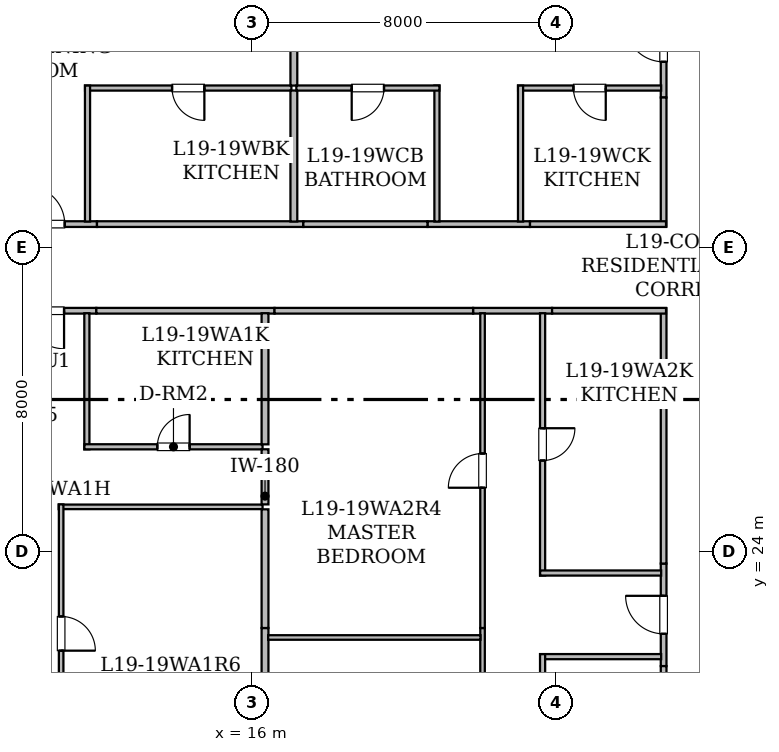
"""IFC4 building model, lengths in metres.
Left out: names, types, materials, properties, quantities, classifications, styles, units other than length and angle.
Written with IfcOpenShell. Run it as: python <this file> out.ifc"""

import sys

from ifc_helpers import new_model, si_unit, direction, frame, frame_2d, origin, place, context, subcontext, project, spatial, rectangle, extrude, element, fill, save


model = new_model("IFC4")
c1 = context("Model", 3, precision=1e-05, world=origin(), true_north=direction((0.0, 1.0)))
c2 = subcontext(c1, "Body", "Model", "MODEL_VIEW")
j1 = project(units=[si_unit("LENGTHUNIT", "METRE"), si_unit("PLANEANGLEUNIT", "RADIAN")], contexts=[c1])
p1 = place(None, origin())
s1 = spatial("IfcSite", under=j1, at=p1, CompositionType="ELEMENT")
p2 = place(p1, origin())
s2 = spatial("IfcBuilding", under=s1, at=p2, CompositionType="ELEMENT")
p3 = place(p2, frame((0.0, 0.0, 77.1)))
s3 = spatial("IfcBuildingStorey", under=s2, at=p3, CompositionType="ELEMENT", Elevation=77.1)
p4 = place(p3, frame((11.907, 30.335, 0.0), z_axis=(0.0, 0.0, 1.0), x_axis=(-1.0, 0.0, 0.0)))
e1 = element("IfcWall", 1, at=p4, inside=s3, PredefinedType="STANDARD", context=c2, shape_type="SweptSolid", body=[
    extrude(rectangle(XDim=2.698, YDim=0.15, at=frame_2d((1.349, 0.0))), origin(), (0.0, 0.0, 1.0), 3.43),
])
p5 = place(p4, frame((0.849, 0.0, 0.0)))
e2 = element("IfcOpeningElement", 2, at=p5, cuts=e1, PredefinedType="OPENING", context=c2, shape_type="SweptSolid", body=[
    extrude(rectangle(XDim=1.0, YDim=2.15, at=frame_2d((0.5, 1.075))), frame((0.0, 0.085, 0.0), z_axis=(0.0, -1.0, 0.0), x_axis=(1.0, 0.0, 0.0)), (0.0, 0.0, 1.0), 0.17),
])
p6 = place(p3, frame((16.596, 30.335, 0.0), z_axis=(0.0, 0.0, 1.0), x_axis=(-1.0, 0.0, 0.0)))
e3 = element("IfcWall", 3, at=p6, inside=s3, PredefinedType="STANDARD", context=c2, shape_type="SweptSolid", body=[
    extrude(rectangle(XDim=4.689, YDim=0.15, at=frame_2d((2.344, 0.0))), origin(), (0.0, 0.0, 1.0), 3.43),
])
p7 = place(p3, frame((26.835, 20.985, 0.0), z_axis=(0.0, 0.0, 1.0), x_axis=(0.0, 1.0, 0.0)))
e4 = element("IfcWall", 4, at=p7, inside=s3, PredefinedType="STANDARD", context=c2, shape_type="SweptSolid", body=[
    extrude(rectangle(XDim=2.698, YDim=0.15, at=frame_2d((1.349, 0.0))), origin(), (0.0, 0.0, 1.0), 3.43),
])
p8 = place(p7, frame((0.849, 0.0, 0.0)))
e5 = element("IfcOpeningElement", 5, at=p8, cuts=e4, PredefinedType="OPENING", context=c2, shape_type="SweptSolid", body=[
    extrude(rectangle(XDim=1.0, YDim=2.15, at=frame_2d((0.5, 1.075))), frame((0.0, 0.085, 0.0), z_axis=(0.0, -1.0, 0.0), x_axis=(1.0, 0.0, 0.0)), (0.0, 0.0, 1.0), 0.17),
])
p9 = place(p3, frame((23.9, 30.335, 0.0), z_axis=(0.0, 0.0, 1.0), x_axis=(-1.0, 0.0, 0.0)))
e6 = element("IfcWall", 6, at=p9, inside=s3, PredefinedType="STANDARD", context=c2, shape_type="SweptSolid", body=[
    extrude(rectangle(XDim=2.079, YDim=0.15, at=frame_2d((1.04, 0.0))), origin(), (0.0, 0.0, 1.0), 3.43),
])
p10 = place(p3, frame((26.835, 17.518, 0.0), z_axis=(0.0, 0.0, 1.0), x_axis=(0.0, 1.0, 0.0)))
e7 = element("IfcWall", 7, at=p10, inside=s3, PredefinedType="STANDARD", context=c2, shape_type="SweptSolid", body=[
    extrude(rectangle(XDim=3.467, YDim=0.15, at=frame_2d((1.733, 0.0))), origin(), (0.0, 0.0, 1.0), 2.647),
])
p11 = place(p3, frame((26.835, 23.683, 0.0), z_axis=(0.0, 0.0, 1.0), x_axis=(0.0, 1.0, 0.0)))
e8 = element("IfcWall", 8, at=p11, inside=s3, PredefinedType="STANDARD", context=c2, shape_type="SweptSolid", body=[
    extrude(rectangle(XDim=6.717, YDim=0.15, at=frame_2d((3.358, 0.0))), origin(), (0.0, 0.0, 1.0), 2.961),
])
p12 = place(p3, frame((26.898, 30.335, 0.0), z_axis=(0.0, 0.0, 1.0), x_axis=(-1.0, 0.0, 0.0)))
e9 = element("IfcWall", 9, at=p12, inside=s3, PredefinedType="STANDARD", context=c2, shape_type="SweptSolid", body=[
    extrude(rectangle(XDim=2.998, YDim=0.15, at=frame_2d((1.499, 0.0))), origin(), (0.0, 0.0, 1.0), 3.43),
])
p13 = place(p3, frame((21.821, 30.335, 0.0), z_axis=(0.0, 0.0, 1.0), x_axis=(-1.0, 0.0, 0.0)))
e10 = element("IfcWall", 10, at=p13, inside=s3, PredefinedType="STANDARD", context=c2, shape_type="SweptSolid", body=[
    extrude(rectangle(XDim=5.225, YDim=0.15, at=frame_2d((2.613, 0.0))), origin(), (0.0, 0.0, 1.0), 2.647),
])
p14 = place(p3, frame((9.226, 32.615, 0.0), z_axis=(0.0, 0.0, 1.0), x_axis=(1.0, 0.0, 0.0)))
e11 = element("IfcWall", 11, at=p14, inside=s3, PredefinedType="STANDARD", context=c2, shape_type="SweptSolid", body=[
    extrude(rectangle(XDim=2.698, YDim=0.15, at=frame_2d((1.349, 0.0))), origin(), (0.0, 0.0, 1.0), 3.43),
])
p15 = place(p14, frame((0.849, 0.0, 0.0)))
e12 = element("IfcOpeningElement", 12, at=p15, cuts=e11, PredefinedType="OPENING", context=c2, shape_type="SweptSolid", body=[
    extrude(rectangle(XDim=1.0, YDim=2.15, at=frame_2d((0.5, 1.075))), frame((0.0, 0.085, 0.0), z_axis=(0.0, -1.0, 0.0), x_axis=(1.0, 0.0, 0.0)), (0.0, 0.0, 1.0), 0.17),
])
p16 = place(p3, frame((11.924, 32.615, 0.0), z_axis=(0.0, 0.0, 1.0), x_axis=(1.0, 0.0, 0.0)))
e13 = element("IfcWall", 13, at=p16, inside=s3, PredefinedType="STANDARD", context=c2, shape_type="SweptSolid", body=[
    extrude(rectangle(XDim=5.43, YDim=0.15, at=frame_2d((2.715, 0.0))), origin(), (0.0, 0.0, 1.0), 3.43),
])
p17 = place(p3, frame((26.835, 35.946, 0.0), z_axis=(0.0, 0.0, 1.0), x_axis=(0.0, 1.0, 0.0)))
e14 = element("IfcWall", 14, at=p17, inside=s3, PredefinedType="STANDARD", context=c2, shape_type="SweptSolid", body=[
    extrude(rectangle(XDim=2.878, YDim=0.15, at=frame_2d((1.439, 0.0))), origin(), (0.0, 0.0, 1.0), 2.647),
])
p18 = place(p17, frame((0.939, 0.0, 0.0)))
e15 = element("IfcOpeningElement", 15, at=p18, cuts=e14, PredefinedType="OPENING", context=c2, shape_type="SweptSolid", body=[
    extrude(rectangle(XDim=1.0, YDim=2.15, at=frame_2d((0.5, 1.075))), frame((0.0, 0.085, 0.0), z_axis=(0.0, -1.0, 0.0), x_axis=(1.0, 0.0, 0.0)), (0.0, 0.0, 1.0), 0.17),
])
p19 = place(p3, frame((20.621, 32.615, 0.0), z_axis=(0.0, 0.0, 1.0), x_axis=(1.0, 0.0, 0.0)))
e16 = element("IfcWall", 16, at=p19, inside=s3, PredefinedType="STANDARD", context=c2, shape_type="SweptSolid", body=[
    extrude(rectangle(XDim=2.698, YDim=0.15, at=frame_2d((1.349, 0.0))), origin(), (0.0, 0.0, 1.0), 3.43),
])
p20 = place(p3, frame((17.354, 32.615, 0.0), z_axis=(0.0, 0.0, 1.0), x_axis=(1.0, 0.0, 0.0)))
e17 = element("IfcWall", 17, at=p20, inside=s3, PredefinedType="STANDARD", context=c2, shape_type="SweptSolid", body=[
    extrude(rectangle(XDim=3.267, YDim=0.15, at=frame_2d((1.634, 0.0))), origin(), (0.0, 0.0, 1.0), 2.647),
])
p21 = place(p3, frame((26.835, 32.55, 0.0), z_axis=(0.0, 0.0, 1.0), x_axis=(0.0, 1.0, 0.0)))
e18 = element("IfcWall", 18, at=p21, inside=s3, PredefinedType="STANDARD", context=c2, shape_type="SweptSolid", body=[
    extrude(rectangle(XDim=3.396, YDim=0.15, at=frame_2d((1.698, 0.0))), origin(), (0.0, 0.0, 1.0), 3.43),
])
p22 = place(p3, frame((23.319, 32.615, 0.0), z_axis=(0.0, 0.0, 1.0), x_axis=(1.0, 0.0, 0.0)))
e19 = element("IfcWall", 19, at=p22, inside=s3, PredefinedType="STANDARD", context=c2, shape_type="SweptSolid", body=[
    extrude(rectangle(XDim=3.579, YDim=0.15, at=frame_2d((1.79, 0.0))), origin(), (0.0, 0.0, 1.0), 3.43),
])
p23 = place(p3, frame((11.658, 30.27, 0.0), z_axis=(0.0, 0.0, 1.0), x_axis=(0.0, -1.0, 0.0)))
e20 = element("IfcWall", 20, at=p23, inside=s3, PredefinedType="PARTITIONING", context=c2, shape_type="SweptSolid", body=[
    extrude(rectangle(XDim=3.58, YDim=0.135, at=frame_2d((1.79, 0.0))), origin(), (0.0, 0.0, 1.0), 3.43),
])
p24 = place(p3, frame((11.593, 26.755, 0.0), z_axis=(0.0, 0.0, 1.0), x_axis=(1.0, 0.0, 0.0)))
e21 = element("IfcWall", 21, at=p24, inside=s3, PredefinedType="PARTITIONING", context=c2, shape_type="SweptSolid", body=[
    extrude(rectangle(XDim=4.688, YDim=0.135, at=frame_2d((2.344, 0.0))), origin(), (0.0, 0.0, 1.0), 3.43),
])
p25 = place(p24, frame((1.919, 0.0, 0.0)))
e22 = element("IfcOpeningElement", 22, at=p25, cuts=e21, PredefinedType="OPENING", context=c2, shape_type="SweptSolid", body=[
    extrude(rectangle(XDim=0.85, YDim=2.1, at=frame_2d((0.425, 1.05))), frame((0.0, 0.077, 0.0), z_axis=(0.0, -1.0, 0.0), x_axis=(1.0, 0.0, 0.0)), (0.0, 0.0, 1.0), 0.155),
])
p26 = place(p3, frame((16.281, 25.175, 0.0), z_axis=(0.0, 0.0, 1.0), x_axis=(-1.0, 0.0, 0.0)))
e23 = element("IfcWall", 23, at=p26, inside=s3, PredefinedType="PARTITIONING", context=c2, shape_type="SweptSolid", body=[
    extrude(rectangle(XDim=5.365, YDim=0.12, at=frame_2d((2.683, 0.0))), origin(), (0.0, 0.0, 1.0), 3.43),
])
p27 = place(p3, frame((10.981, 25.24, 0.0), z_axis=(0.0, 0.0, 1.0), x_axis=(0.0, -1.0, 0.0)))
e24 = element("IfcWall", 24, at=p27, inside=s3, PredefinedType="PARTITIONING", context=c2, shape_type="SweptSolid", body=[
    extrude(rectangle(XDim=6.798, YDim=0.12, at=frame_2d((3.399, 0.0))), origin(), (0.0, 0.0, 1.0), 2.961),
])
p28 = place(p27, frame((2.949, 0.0, 0.0)))
e25 = element("IfcOpeningElement", 25, at=p28, cuts=e24, PredefinedType="OPENING", context=c2, shape_type="SweptSolid", body=[
    extrude(rectangle(XDim=0.9, YDim=2.1, at=frame_2d((0.45, 1.05))), frame((0.0, 0.07, 0.0), z_axis=(0.0, -1.0, 0.0), x_axis=(1.0, 0.0, 0.0)), (0.0, 0.0, 1.0), 0.14),
])
p29 = place(p3, frame((16.346, 26.69, 0.0), z_axis=(0.0, 0.0, 1.0), x_axis=(0.0, -1.0, 0.0)))
e26 = element("IfcWall", 26, at=p29, inside=s3, PredefinedType="STANDARD", context=c2, shape_type="SweptSolid", body=[
    extrude(rectangle(XDim=1.45, YDim=0.18, at=frame_2d((0.725, 0.0))), origin(), (0.0, 0.0, 1.0), 3.43),
])
p30 = place(p3, frame((16.346, 30.27, 0.0), z_axis=(0.0, 0.0, 1.0), x_axis=(0.0, -1.0, 0.0)))
e27 = element("IfcWall", 27, at=p30, inside=s3, PredefinedType="STANDARD", context=c2, shape_type="SweptSolid", body=[
    extrude(rectangle(XDim=3.45, YDim=0.18, at=frame_2d((1.725, 0.0))), origin(), (0.0, 0.0, 1.0), 3.43),
])
p31 = place(p3, frame((16.346, 21.987, 0.0), z_axis=(0.0, 0.0, 1.0), x_axis=(0.0, -1.0, 0.0)))
e28 = element("IfcWall", 28, at=p31, inside=s3, PredefinedType="STANDARD", context=c2, shape_type="SweptSolid", body=[
    extrude(rectangle(XDim=3.73, YDim=0.18, at=frame_2d((1.865, 0.0))), origin(), (0.0, 0.0, 1.0), 3.43),
])
p32 = place(p3, frame((16.346, 25.11, 0.0), z_axis=(0.0, 0.0, 1.0), x_axis=(0.0, -1.0, 0.0)))
e29 = element("IfcWall", 29, at=p32, inside=s3, PredefinedType="STANDARD", context=c2, shape_type="SweptSolid", body=[
    extrude(rectangle(XDim=3.123, YDim=0.18, at=frame_2d((1.562, 0.0))), origin(), (0.0, 0.0, 1.0), 2.961),
])
p33 = place(p3, frame((26.77, 21.234, 0.0), z_axis=(0.0, 0.0, 1.0), x_axis=(-1.0, 0.0, 0.0)))
e30 = element("IfcWall", 30, at=p33, inside=s3, PredefinedType="PARTITIONING", context=c2, shape_type="SweptSolid", body=[
    extrude(rectangle(XDim=3.185, YDim=0.135, at=frame_2d((1.593, 0.0))), origin(), (0.0, 0.0, 1.0), 3.43),
])
p34 = place(p3, frame((23.65, 21.299, 0.0), z_axis=(0.0, 0.0, 1.0), x_axis=(0.0, -1.0, 0.0)))
e31 = element("IfcWall", 31, at=p34, inside=s3, PredefinedType="PARTITIONING", context=c2, shape_type="SweptSolid", body=[
    extrude(rectangle(XDim=4.095, YDim=0.135, at=frame_2d((2.047, 0.0))), origin(), (0.0, 0.0, 1.0), 2.647),
])
p35 = place(p34, frame((1.622, 0.0, 0.0)))
e32 = element("IfcOpeningElement", 32, at=p35, cuts=e31, PredefinedType="OPENING", context=c2, shape_type="SweptSolid", body=[
    extrude(rectangle(XDim=0.85, YDim=2.1, at=frame_2d((0.425, 1.05))), frame((0.0, 0.077, 0.0), z_axis=(0.0, -1.0, 0.0), x_axis=(1.0, 0.0, 0.0)), (0.0, 0.0, 1.0), 0.155),
])
p36 = place(p3, frame((23.65, 30.27, 0.0), z_axis=(0.0, 0.0, 1.0), x_axis=(0.0, -1.0, 0.0)))
e33 = element("IfcWall", 33, at=p36, inside=s3, PredefinedType="PARTITIONING", context=c2, shape_type="SweptSolid", body=[
    extrude(rectangle(XDim=6.901, YDim=0.135, at=frame_2d((3.451, 0.0))), origin(), (0.0, 0.0, 1.0), 2.961),
])
p37 = place(p36, frame((3.026, 0.0, 0.0)))
e34 = element("IfcOpeningElement", 34, at=p37, cuts=e33, PredefinedType="OPENING", context=c2, shape_type="SweptSolid", body=[
    extrude(rectangle(XDim=0.85, YDim=2.1, at=frame_2d((0.425, 1.05))), frame((0.0, 0.077, 0.0), z_axis=(0.0, -1.0, 0.0), x_axis=(1.0, 0.0, 0.0)), (0.0, 0.0, 1.0), 0.155),
])
p38 = place(p3, frame((23.585, 23.434, 0.0), z_axis=(0.0, 0.0, 1.0), x_axis=(1.0, 0.0, 0.0)))
e35 = element("IfcWall", 35, at=p38, inside=s3, PredefinedType="PARTITIONING", context=c2, shape_type="SweptSolid", body=[
    extrude(rectangle(XDim=3.185, YDim=0.135, at=frame_2d((1.593, 0.0))), origin(), (0.0, 0.0, 1.0), 3.43),
])
p39 = place(p3, frame((22.07, 14.617, 0.0), z_axis=(0.0, 0.0, 1.0), x_axis=(0.0, 1.0, 0.0)))
e36 = element("IfcWall", 36, at=p39, inside=s3, PredefinedType="PARTITIONING", context=c2, shape_type="SweptSolid", body=[
    extrude(rectangle(XDim=7.37, YDim=0.12, at=frame_2d((3.685, 0.0))), origin(), (0.0, 0.0, 1.0), 2.647),
])
p40 = place(p39, frame((3.214, 0.0, 0.0)))
e37 = element("IfcOpeningElement", 37, at=p40, cuts=e36, PredefinedType="OPENING", context=c2, shape_type="SweptSolid", body=[
    extrude(rectangle(XDim=0.9, YDim=2.1, at=frame_2d((0.45, 1.05))), frame((0.0, 0.07, 0.0), z_axis=(0.0, -1.0, 0.0), x_axis=(1.0, 0.0, 0.0)), (0.0, 0.0, 1.0), 0.14),
])
p41 = place(p3, frame((22.07, 21.987, 0.0), z_axis=(0.0, 0.0, 1.0), x_axis=(0.0, 1.0, 0.0)))
e38 = element("IfcWall", 38, at=p41, inside=s3, PredefinedType="PARTITIONING", context=c2, shape_type="SweptSolid", body=[
    extrude(rectangle(XDim=8.283, YDim=0.12, at=frame_2d((4.142, 0.0))), origin(), (0.0, 0.0, 1.0), 2.961),
])
p42 = place(p41, frame((3.691, 0.0, 0.0)))
e39 = element("IfcOpeningElement", 39, at=p42, cuts=e38, PredefinedType="OPENING", context=c2, shape_type="SweptSolid", body=[
    extrude(rectangle(XDim=0.9, YDim=2.1, at=frame_2d((0.45, 1.05))), frame((0.0, 0.07, 0.0), z_axis=(0.0, -1.0, 0.0), x_axis=(1.0, 0.0, 0.0)), (0.0, 0.0, 1.0), 0.14),
])
p43 = place(p3, frame((16.428, 21.738, 0.0), z_axis=(0.0, 0.0, 1.0), x_axis=(1.0, 0.0, 0.0)))
e40 = element("IfcWall", 40, at=p43, inside=s3, PredefinedType="PARTITIONING", context=c2, shape_type="SweptSolid", body=[
    extrude(rectangle(XDim=5.588, YDim=0.12, at=frame_2d((2.794, 0.0))), origin(), (0.0, 0.0, 1.0), 2.647),
])
p44 = place(p3, frame((17.04, 36.195, 0.0), z_axis=(0.0, 0.0, 1.0), x_axis=(-1.0, 0.0, 0.0)))
e41 = element("IfcWall", 41, at=p44, inside=s3, PredefinedType="PARTITIONING", context=c2, shape_type="SweptSolid", body=[
    extrude(rectangle(XDim=5.43, YDim=0.135, at=frame_2d((2.715, 0.0))), origin(), (0.0, 0.0, 1.0), 3.43),
])
p45 = place(p44, frame((2.29, 0.0, 0.0)))
e42 = element("IfcOpeningElement", 42, at=p45, cuts=e41, PredefinedType="OPENING", context=c2, shape_type="SweptSolid", body=[
    extrude(rectangle(XDim=0.85, YDim=2.1, at=frame_2d((0.425, 1.05))), frame((0.0, 0.077, 0.0), z_axis=(0.0, -1.0, 0.0), x_axis=(1.0, 0.0, 0.0)), (0.0, 0.0, 1.0), 0.155),
])
p46 = place(p3, frame((11.675, 36.26, 0.0), z_axis=(0.0, 0.0, 1.0), x_axis=(0.0, -1.0, 0.0)))
e43 = element("IfcWall", 43, at=p46, inside=s3, PredefinedType="PARTITIONING", context=c2, shape_type="SweptSolid", body=[
    extrude(rectangle(XDim=3.578, YDim=0.135, at=frame_2d((1.789, 0.0))), origin(), (0.0, 0.0, 1.0), 3.43),
])
p47 = place(p3, frame((17.105, 38.51, 0.0), z_axis=(0.0, 0.0, 1.0), x_axis=(0.0, -1.0, 0.0)))
e44 = element("IfcWall", 44, at=p47, inside=s3, PredefinedType="STANDARD", context=c2, shape_type="SweptSolid", body=[
    extrude(rectangle(XDim=2.25, YDim=0.18, at=frame_2d((1.125, 0.0))), origin(), (0.0, 0.0, 1.0), 2.647),
])
p48 = place(p3, frame((17.105, 36.13, 0.0), z_axis=(0.0, 0.0, 1.0), x_axis=(0.0, -1.0, 0.0)))
e45 = element("IfcWall", 45, at=p48, inside=s3, PredefinedType="STANDARD", context=c2, shape_type="SweptSolid", body=[
    extrude(rectangle(XDim=3.448, YDim=0.18, at=frame_2d((1.724, 0.0))), origin(), (0.0, 0.0, 1.0), 3.43),
])
p49 = place(p3, frame((20.87, 32.682, 0.0), z_axis=(0.0, 0.0, 1.0), x_axis=(0.0, 1.0, 0.0)))
e46 = element("IfcWall", 46, at=p49, inside=s3, PredefinedType="PARTITIONING", context=c2, shape_type="SweptSolid", body=[
    extrude(rectangle(XDim=3.578, YDim=0.135, at=frame_2d((1.789, 0.0))), origin(), (0.0, 0.0, 1.0), 3.43),
])
p50 = place(p3, frame((20.935, 36.195, 0.0), z_axis=(0.0, 0.0, 1.0), x_axis=(-1.0, 0.0, 0.0)))
e47 = element("IfcWall", 47, at=p50, inside=s3, PredefinedType="PARTITIONING", context=c2, shape_type="SweptSolid", body=[
    extrude(rectangle(XDim=3.765, YDim=0.135, at=frame_2d((1.883, 0.0))), origin(), (0.0, 0.0, 1.0), 2.647),
])
p51 = place(p50, frame((1.458, 0.0, 0.0)))
e48 = element("IfcOpeningElement", 48, at=p51, cuts=e47, PredefinedType="OPENING", context=c2, shape_type="SweptSolid", body=[
    extrude(rectangle(XDim=0.85, YDim=2.1, at=frame_2d((0.425, 1.05))), frame((0.0, 0.077, 0.0), z_axis=(0.0, -1.0, 0.0), x_axis=(1.0, 0.0, 0.0)), (0.0, 0.0, 1.0), 0.155),
])
p52 = place(p3, frame((26.77, 36.195, 0.0), z_axis=(0.0, 0.0, 1.0), x_axis=(-1.0, 0.0, 0.0)))
e49 = element("IfcWall", 49, at=p52, inside=s3, PredefinedType="PARTITIONING", context=c2, shape_type="SweptSolid", body=[
    extrude(rectangle(XDim=3.765, YDim=0.135, at=frame_2d((1.883, 0.0))), origin(), (0.0, 0.0, 1.0), 3.43),
])
p53 = place(p52, frame((1.458, 0.0, 0.0)))
e50 = element("IfcOpeningElement", 50, at=p53, cuts=e49, PredefinedType="OPENING", context=c2, shape_type="SweptSolid", body=[
    extrude(rectangle(XDim=0.85, YDim=2.1, at=frame_2d((0.425, 1.05))), frame((0.0, 0.077, 0.0), z_axis=(0.0, -1.0, 0.0), x_axis=(1.0, 0.0, 0.0)), (0.0, 0.0, 1.0), 0.155),
])
p54 = place(p3, frame((23.07, 36.26, 0.0), z_axis=(0.0, 0.0, 1.0), x_axis=(0.0, -1.0, 0.0)))
e51 = element("IfcWall", 51, at=p54, inside=s3, PredefinedType="PARTITIONING", context=c2, shape_type="SweptSolid", body=[
    extrude(rectangle(XDim=3.578, YDim=0.135, at=frame_2d((1.789, 0.0))), origin(), (0.0, 0.0, 1.0), 3.43),
])
p55 = place(p5, origin())
e52 = element("IfcDoor", 52, at=p55, inside=s3, OperationType="SINGLE_SWING_LEFT", PredefinedType="DOOR", context=c2, shape_type="SweptSolid", body=[
    extrude(rectangle(XDim=1.0, YDim=2.15, at=frame_2d((0.5, 1.075))), frame((0.0, 0.025, 0.0), z_axis=(0.0, -1.0, 0.0), x_axis=(1.0, 0.0, 0.0)), (0.0, 0.0, 1.0), 0.05),
])
fill(e2, e52)
p56 = place(p8, origin())
e53 = element("IfcDoor", 53, at=p56, inside=s3, OperationType="SINGLE_SWING_RIGHT", PredefinedType="DOOR", context=c2, shape_type="SweptSolid", body=[
    extrude(rectangle(XDim=1.0, YDim=2.15, at=frame_2d((0.5, 1.075))), frame((0.0, 0.025, 0.0), z_axis=(0.0, -1.0, 0.0), x_axis=(1.0, 0.0, 0.0)), (0.0, 0.0, 1.0), 0.05),
])
fill(e5, e53)
p57 = place(p15, origin())
e54 = element("IfcDoor", 54, at=p57, inside=s3, OperationType="SINGLE_SWING_LEFT", PredefinedType="DOOR", context=c2, shape_type="SweptSolid", body=[
    extrude(rectangle(XDim=1.0, YDim=2.15, at=frame_2d((0.5, 1.075))), frame((0.0, 0.025, 0.0), z_axis=(0.0, -1.0, 0.0), x_axis=(1.0, 0.0, 0.0)), (0.0, 0.0, 1.0), 0.05),
])
fill(e12, e54)
p58 = place(p18, origin())
e55 = element("IfcDoor", 55, at=p58, inside=s3, OperationType="SINGLE_SWING_RIGHT", PredefinedType="DOOR", context=c2, shape_type="SweptSolid", body=[
    extrude(rectangle(XDim=1.0, YDim=2.15, at=frame_2d((0.5, 1.075))), frame((0.0, 0.025, 0.0), z_axis=(0.0, -1.0, 0.0), x_axis=(1.0, 0.0, 0.0)), (0.0, 0.0, 1.0), 0.05),
])
fill(e15, e55)
p59 = place(p25, origin())
e56 = element("IfcDoor", 56, at=p59, inside=s3, OperationType="SINGLE_SWING_RIGHT", PredefinedType="DOOR", context=c2, shape_type="SweptSolid", body=[
    extrude(rectangle(XDim=0.85, YDim=2.1, at=frame_2d((0.425, 1.05))), frame((0.0, 0.025, 0.0), z_axis=(0.0, -1.0, 0.0), x_axis=(1.0, 0.0, 0.0)), (0.0, 0.0, 1.0), 0.05),
])
fill(e22, e56)
p60 = place(p28, origin())
e57 = element("IfcDoor", 57, at=p60, inside=s3, OperationType="SINGLE_SWING_RIGHT", PredefinedType="DOOR", context=c2, shape_type="SweptSolid", body=[
    extrude(rectangle(XDim=0.9, YDim=2.1, at=frame_2d((0.45, 1.05))), frame((0.0, 0.025, 0.0), z_axis=(0.0, -1.0, 0.0), x_axis=(1.0, 0.0, 0.0)), (0.0, 0.0, 1.0), 0.05),
])
fill(e25, e57)
p61 = place(p37, origin())
e58 = element("IfcDoor", 58, at=p61, inside=s3, OperationType="SINGLE_SWING_LEFT", PredefinedType="DOOR", context=c2, shape_type="SweptSolid", body=[
    extrude(rectangle(XDim=0.85, YDim=2.1, at=frame_2d((0.425, 1.05))), frame((0.0, 0.025, 0.0), z_axis=(0.0, -1.0, 0.0), x_axis=(1.0, 0.0, 0.0)), (0.0, 0.0, 1.0), 0.05),
])
fill(e34, e58)
p62 = place(p42, origin())
e59 = element("IfcDoor", 59, at=p62, inside=s3, OperationType="SINGLE_SWING_LEFT", PredefinedType="DOOR", context=c2, shape_type="SweptSolid", body=[
    extrude(rectangle(XDim=0.9, YDim=2.1, at=frame_2d((0.45, 1.05))), frame((0.0, 0.025, 0.0), z_axis=(0.0, -1.0, 0.0), x_axis=(1.0, 0.0, 0.0)), (0.0, 0.0, 1.0), 0.05),
])
fill(e39, e59)
p63 = place(p45, origin())
e60 = element("IfcDoor", 60, at=p63, inside=s3, OperationType="SINGLE_SWING_LEFT", PredefinedType="DOOR", context=c2, shape_type="SweptSolid", body=[
    extrude(rectangle(XDim=0.85, YDim=2.1, at=frame_2d((0.425, 1.05))), frame((0.0, 0.025, 0.0), z_axis=(0.0, -1.0, 0.0), x_axis=(1.0, 0.0, 0.0)), (0.0, 0.0, 1.0), 0.05),
])
fill(e42, e60)
p64 = place(p51, origin())
e61 = element("IfcDoor", 61, at=p64, inside=s3, OperationType="SINGLE_SWING_RIGHT", PredefinedType="DOOR", context=c2, shape_type="SweptSolid", body=[
    extrude(rectangle(XDim=0.85, YDim=2.1, at=frame_2d((0.425, 1.05))), frame((0.0, 0.025, 0.0), z_axis=(0.0, -1.0, 0.0), x_axis=(1.0, 0.0, 0.0)), (0.0, 0.0, 1.0), 0.05),
])
fill(e48, e61)
p65 = place(p53, origin())
e62 = element("IfcDoor", 62, at=p65, inside=s3, OperationType="SINGLE_SWING_LEFT", PredefinedType="DOOR", context=c2, shape_type="SweptSolid", body=[
    extrude(rectangle(XDim=0.85, YDim=2.1, at=frame_2d((0.425, 1.05))), frame((0.0, 0.025, 0.0), z_axis=(0.0, -1.0, 0.0), x_axis=(1.0, 0.0, 0.0)), (0.0, 0.0, 1.0), 0.05),
])
fill(e50, e62)
save(model, sys.argv[1])
